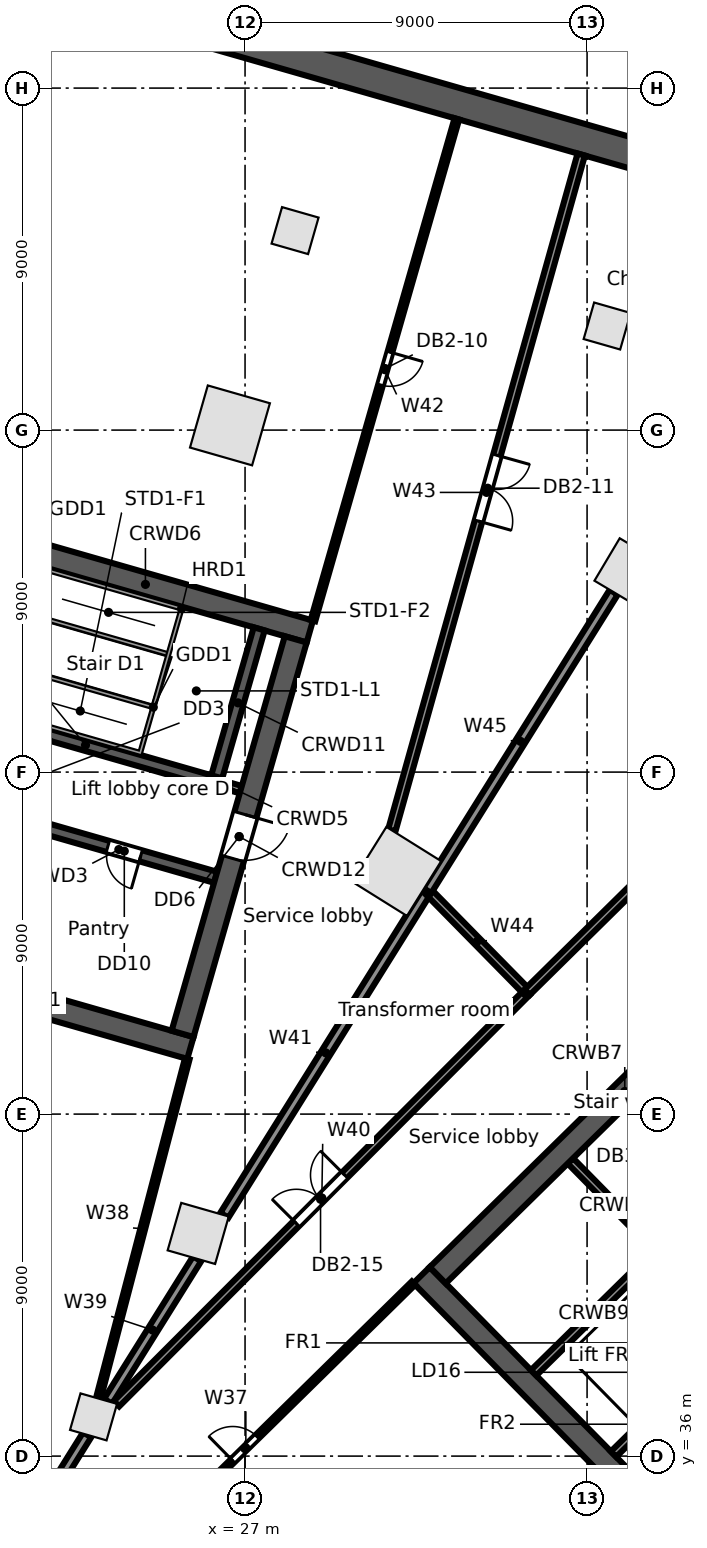
"""IFC4 building model, lengths in metres.
Left out: names, types, materials, properties, quantities, classifications, styles, units other than length and angle.
Written with IfcOpenShell. Run it as: python <this file> out.ifc"""

import sys

from ifc_helpers import new_model, si_unit, direction, frame, frame_2d, origin, origin_2d, place, context, subcontext, project, spatial, rectangle, extrude, element, fill, save


model = new_model("IFC4")
c1 = context("Model", 3, precision=1e-05, world=origin(), true_north=direction((0.0, 1.0)))
c2 = subcontext(c1, "Body", "Model", "MODEL_VIEW")
j1 = project(units=[si_unit("LENGTHUNIT", "METRE"), si_unit("PLANEANGLEUNIT", "RADIAN")], contexts=[c1])
p1 = place(None, origin())
s1 = spatial("IfcSite", under=j1, at=p1, CompositionType="ELEMENT")
p2 = place(p1, origin())
s2 = spatial("IfcBuilding", under=s1, at=p2, CompositionType="ELEMENT")
p3 = place(p2, frame((0.0, 0.0, -9.6)))
s3 = spatial("IfcBuildingStorey", under=s2, at=p3, CompositionType="ELEMENT", Elevation=-9.6)
p4 = place(p3, frame((38.062, 70.032, -0.5), z_axis=(0.0, 0.0, 1.0), x_axis=(-0.961260654426, 0.275640987977, 0.0)))
e1 = element("IfcWall", 1, at=p4, inside=s3, PredefinedType="SOLIDWALL", context=c2, shape_type="SweptSolid", body=[
    extrude(rectangle(XDim=35.435, YDim=0.8, at=frame_2d((17.718, 0.0))), origin(), (0.0, 0.0, 1.0), 5.3),
])
p5 = place(p3, frame((37.085, 59.262, -0.5), z_axis=(0.0, 0.0, 1.0), x_axis=(-0.859406411501, 0.511293086077, 0.0)))
e2 = element("IfcColumn", 2, at=p5, inside=s3, PredefinedType="COLUMN", context=c2, shape_type="SweptSolid", body=[
    extrude(rectangle(XDim=1.3, YDim=1.3, at=origin_2d()), origin(), (0.0, 0.0, 1.0), 5.3),
])
p6 = place(p3, frame((26.603, 63.124, -0.5), z_axis=(0.0, 0.0, 1.0), x_axis=(-0.961261695938, 0.275637355817, 0.0)))
e3 = element("IfcColumn", 3, at=p6, inside=s3, PredefinedType="COLUMN", context=c2, shape_type="SweptSolid", body=[
    extrude(rectangle(XDim=1.7, YDim=1.7, at=origin_2d()), origin(), (0.0, 0.0, 1.0), 5.3),
])
p7 = place(p3, frame((25.767, 41.86, -0.5), z_axis=(0.0, 0.0, 1.0), x_axis=(0.961261695938, -0.275637355817, 0.0)))
e4 = element("IfcColumn", 4, at=p7, inside=s3, PredefinedType="COLUMN", context=c2, shape_type="SweptSolid", body=[
    extrude(rectangle(XDim=1.3, YDim=1.3, at=origin_2d()), origin(), (0.0, 0.0, 1.0), 5.3),
])
p8 = place(p3, frame((30.99, 51.386, -0.5), z_axis=(0.0, 0.0, 1.0), x_axis=(0.529919264233, 0.848048096156, 0.0)))
e5 = element("IfcColumn", 5, at=p8, inside=s3, PredefinedType="COLUMN", context=c2, shape_type="SweptSolid", body=[
    extrude(rectangle(XDim=1.7, YDim=1.7, at=origin_2d()), origin(), (0.0, 0.0, 1.0), 5.3),
])
for number, where, z_axis, x_axis in (
    (6, (36.528, 65.739, -0.5), (0.0, 0.0, 1.0), (-0.961, 0.276, 0.0)),
    (7, (28.316, 68.25, -0.5), (0.0, 0.0, 1.0), (-0.961, 0.276, 0.0)),
    (8, (23.013, 37.032, -0.5), (0.0, 0.0, 1.0), (0.961, -0.276, 0.0)),
):
    element("IfcColumn", number, at=place(p3, frame(where, z_axis=z_axis, x_axis=x_axis)), inside=s3, PredefinedType="COLUMN", context=c2, shape_type="SweptSolid", body=[
        extrude(rectangle(XDim=1.0, YDim=1.0, at=origin_2d()), origin(), (0.0, 0.0, 1.0), 5.3),
    ])
p9 = place(p3, frame((31.646, 40.763, 0.0), z_axis=(0.0, 0.0, 1.0), x_axis=(0.700911255944, -0.713248491965, 0.0)))
e9 = element("IfcWall", 9, at=p9, inside=s3, PredefinedType="SOLIDWALL", context=c2, shape_type="SweptSolid", body=[
    extrude(rectangle(XDim=15.0, YDim=0.6, at=frame_2d((7.5, 0.0))), origin(), (0.0, 0.0, 1.0), 4.4),
])
p10 = place(p9, frame((12.9, 0.0, 0.0)))
e10 = element("IfcOpeningElement", 10, at=p10, cuts=e9, PredefinedType="OPENING", context=c2, shape_type="SweptSolid", body=[
    extrude(rectangle(XDim=1.2, YDim=2.1, at=frame_2d((0.6, 1.05))), frame((0.0, 0.31, 0.0), z_axis=(0.0, -1.0, 0.0), x_axis=(1.0, 0.0, 0.0)), (0.0, 0.0, 1.0), 0.62),
])
p11 = place(p3, frame((35.561, 43.769, 0.0), z_axis=(0.0, 0.0, 1.0), x_axis=(0.70090232736, -0.713257266, 0.0)))
e11 = element("IfcWall", 11, at=p11, inside=s3, PredefinedType="SOLIDWALL", context=c2, shape_type="SweptSolid", body=[
    extrude(rectangle(XDim=3.3, YDim=0.2, at=frame_2d((1.65, 0.0))), origin(), (0.0, 0.0, 1.0), 4.4),
])
p12 = place(p3, frame((32.07, 40.759, 0.0), z_axis=(0.0, 0.0, 1.0), x_axis=(0.713245344712, 0.70091445858, 0.0)))
e12 = element("IfcWall", 12, at=p12, inside=s3, PredefinedType="SOLIDWALL", context=c2, shape_type="SweptSolid", body=[
    extrude(rectangle(XDim=13.8, YDim=0.6, at=frame_2d((6.9, 0.0))), origin(), (0.0, 0.0, 1.0), 4.4),
])
p13 = place(p3, frame((37.104, 42.342, 0.0), z_axis=(0.0, 0.0, 1.0), x_axis=(0.713281298468, 0.700877870428, 0.0)))
e13 = element("IfcWall", 13, at=p13, inside=s3, PredefinedType="PARTITIONING", context=c2, shape_type="SweptSolid", body=[
    extrude(rectangle(XDim=4.35, YDim=0.2, at=frame_2d((2.175, 0.0))), origin(), (0.0, 0.0, 1.0), 4.4),
])
p14 = place(p13, frame((1.7, 0.0, 0.0)))
e14 = element("IfcOpeningElement", 14, at=p14, cuts=e13, PredefinedType="OPENING", context=c2, shape_type="SweptSolid", body=[
    extrude(rectangle(XDim=1.0, YDim=2.1, at=frame_2d((0.5, 1.05))), frame((0.0, 0.11, 0.0), z_axis=(0.0, -1.0, 0.0), x_axis=(1.0, 0.0, 0.0)), (0.0, 0.0, 1.0), 0.22),
])
p15 = place(p3, frame((34.593, 38.191, 0.0), z_axis=(0.0, 0.0, 1.0), x_axis=(0.713252216116, 0.700907466222, 0.0)))
e15 = element("IfcWall", 15, at=p15, inside=s3, PredefinedType="SOLIDWALL", context=c2, shape_type="SweptSolid", body=[
    extrude(rectangle(XDim=4.45, YDim=0.2, at=frame_2d((2.225, 0.0))), origin(), (0.0, 0.0, 1.0), 4.4),
])
p16 = place(p3, frame((36.696, 36.052, 0.0), z_axis=(0.0, 0.0, 1.0), x_axis=(0.713251741427, 0.700907949271, 0.0)))
e16 = element("IfcWall", 16, at=p16, inside=s3, PredefinedType="SOLIDWALL", context=c2, shape_type="SweptSolid", body=[
    extrude(rectangle(XDim=4.45, YDim=0.2, at=frame_2d((2.225, 0.0))), origin(), (0.0, 0.0, 1.0), 4.4),
])
p17 = place(p3, frame((16.911, 49.221, 0.0), z_axis=(0.0, 0.0, 1.0), x_axis=(0.96126248289, -0.275634611374, 0.0)))
e17 = element("IfcWall", 17, at=p17, inside=s3, PredefinedType="SOLIDWALL", context=c2, shape_type="SweptSolid", body=[
    extrude(rectangle(XDim=9.0, YDim=0.6, at=frame_2d((4.5, 0.0))), origin(), (0.0, 0.0, 1.0), 4.4),
])
p18 = place(p3, frame((21.131, 52.692, 0.0), z_axis=(0.0, 0.0, 1.0), x_axis=(0.961271492568, -0.275603188616, 0.0)))
e18 = element("IfcWall", 18, at=p18, inside=s3, PredefinedType="SOLIDWALL", context=c2, shape_type="SweptSolid", body=[
    extrude(rectangle(XDim=5.3, YDim=0.3, at=frame_2d((2.65, 0.0))), origin(), (0.0, 0.0, 1.0), 4.4),
])
p19 = place(p18, frame((2.35, 0.0, 0.0)))
e19 = element("IfcOpeningElement", 19, at=p19, cuts=e18, PredefinedType="OPENING", context=c2, shape_type="SweptSolid", body=[
    extrude(rectangle(XDim=0.9, YDim=2.1, at=frame_2d((0.45, 1.05))), frame((0.0, 0.16, 0.0), z_axis=(0.0, -1.0, 0.0), x_axis=(1.0, 0.0, 0.0)), (0.0, 0.0, 1.0), 0.32),
])
p20 = place(p3, frame((19.389, 55.689, 0.0), z_axis=(0.0, 0.0, 1.0), x_axis=(0.961261397636, -0.275638396117, 0.0)))
e20 = element("IfcWall", 20, at=p20, inside=s3, PredefinedType="SOLIDWALL", context=c2, shape_type="SweptSolid", body=[
    extrude(rectangle(XDim=7.1, YDim=0.3, at=frame_2d((3.55, 0.0))), origin(), (0.0, 0.0, 1.0), 4.4),
])
p21 = place(p20, frame((0.2, 0.0, 0.0)))
e21 = element("IfcOpeningElement", 21, at=p21, cuts=e20, PredefinedType="OPENING", context=c2, shape_type="SweptSolid", body=[
    extrude(rectangle(XDim=1.0, YDim=2.1, at=frame_2d((0.5, 1.05))), frame((0.0, 0.16, 0.0), z_axis=(0.0, -1.0, 0.0), x_axis=(1.0, 0.0, 0.0)), (0.0, 0.0, 1.0), 0.32),
])
p22 = place(p3, frame((26.214, 53.732, 0.0), z_axis=(0.0, 0.0, 1.0), x_axis=(0.96122076476, -0.27578005982, 0.0)))
e22 = element("IfcWall", 22, at=p22, inside=s3, PredefinedType="SOLIDWALL", context=c2, shape_type="SweptSolid", body=[
    extrude(rectangle(XDim=0.7, YDim=0.2, at=frame_2d((0.35, 0.0))), origin(), (0.0, 0.0, 1.0), 4.4),
])
p23 = place(p3, frame((20.053, 60.18, 0.0), z_axis=(0.0, 0.0, 1.0), x_axis=(0.96126248289, -0.275634611374, 0.0)))
e23 = element("IfcWall", 23, at=p23, inside=s3, PredefinedType="SOLIDWALL", context=c2, shape_type="SweptSolid", body=[
    extrude(rectangle(XDim=9.0, YDim=0.6, at=frame_2d((4.5, 0.0))), origin(), (0.0, 0.0, 1.0), 4.4),
])
p24 = place(p3, frame((26.256, 53.876, 0.0), z_axis=(0.0, 0.0, 1.0), x_axis=(0.275612739511, 0.961268754209, 0.0)))
e24 = element("IfcWall", 24, at=p24, inside=s3, PredefinedType="SOLIDWALL", context=c2, shape_type="SweptSolid", body=[
    extrude(rectangle(XDim=4.05, YDim=0.3, at=frame_2d((2.025, 0.0))), origin(), (0.0, 0.0, 1.0), 4.4),
])
p25 = place(p3, frame((25.356, 47.112, 0.0), z_axis=(0.0, 0.0, 1.0), x_axis=(0.275631631629, 0.961263337304, 0.0)))
e25 = element("IfcWall", 25, at=p25, inside=s3, PredefinedType="SOLIDWALL", context=c2, shape_type="SweptSolid", body=[
    extrude(rectangle(XDim=10.8, YDim=0.6, at=frame_2d((5.4, 0.0))), origin(), (0.0, 0.0, 1.0), 4.4),
])
p26 = place(p25, frame((4.8, 0.0, 0.0)))
e26 = element("IfcOpeningElement", 26, at=p26, cuts=e25, PredefinedType="OPENING", context=c2, shape_type="SweptSolid", body=[
    extrude(rectangle(XDim=1.2, YDim=2.1, at=frame_2d((0.6, 1.05))), frame((0.0, 0.31, 0.0), z_axis=(0.0, -1.0, 0.0), x_axis=(1.0, 0.0, 0.0)), (0.0, 0.0, 1.0), 0.62),
])
p27 = place(p3, frame((20.916, 33.472, 0.0), z_axis=(0.0, 0.0, 1.0), x_axis=(0.529775918086, 0.848137651927, 0.0)))
e27 = element("IfcWall", 27, at=p27, inside=s3, PredefinedType="PARTITIONING", context=c2, shape_type="SweptSolid", body=[
    extrude(rectangle(XDim=3.641, YDim=0.25, at=frame_2d((1.821, 0.0))), origin(), (0.0, 0.0, 1.0), 4.4),
])
p28 = place(p3, frame((22.61, 31.884, 0.0), z_axis=(0.0, 0.0, 1.0), x_axis=(0.71329764845, 0.700861230712, 0.0)))
e28 = element("IfcWall", 28, at=p28, inside=s3, PredefinedType="PARTITIONING", context=c2, shape_type="SweptSolid", body=[
    extrude(rectangle(XDim=12.368, YDim=0.125, at=frame_2d((6.184, 0.0))), origin(), (0.0, 0.0, 1.0), 3.68),
])
p29 = place(p28, frame((5.7, 0.0, 0.0)))
e29 = element("IfcOpeningElement", 29, at=p29, cuts=e28, PredefinedType="OPENING", context=c2, shape_type="SweptSolid", body=[
    extrude(rectangle(XDim=0.9, YDim=2.1, at=frame_2d((0.45, 1.05))), frame((0.0, 0.073, 0.0), z_axis=(0.0, -1.0, 0.0), x_axis=(1.0, 0.0, 0.0)), (0.0, 0.0, 1.0), 0.145),
])
p30 = place(p3, frame((23.139, 37.516, 0.0), z_axis=(0.0, 0.0, 1.0), x_axis=(0.253335246865, 0.967378546741, 0.0)))
e30 = element("IfcWall", 30, at=p30, inside=s3, PredefinedType="PARTITIONING", context=c2, shape_type="SweptSolid", body=[
    extrude(rectangle(XDim=9.237, YDim=0.125, at=frame_2d((4.619, 0.0))), origin(), (0.0, 0.0, 1.0), 3.768),
])
p31 = place(p3, frame((23.396, 37.442, 0.0), z_axis=(0.0, 0.0, 1.0), x_axis=(0.529879823435, 0.848072740227, 0.0)))
e31 = element("IfcWall", 31, at=p31, inside=s3, PredefinedType="PARTITIONING", context=c2, shape_type="SweptSolid", body=[
    extrude(rectangle(XDim=4.422, YDim=0.25, at=frame_2d((2.211, 0.0))), origin(), (0.0, 0.0, 1.0), 3.462),
])
p32 = place(p3, frame((23.618, 37.379, 0.0), z_axis=(0.0, 0.0, 1.0), x_axis=(0.706356332605, 0.707856434165, 0.0)))
e32 = element("IfcWall", 32, at=p32, inside=s3, PredefinedType="PARTITIONING", context=c2, shape_type="SweptSolid", body=[
    extrude(rectangle(XDim=15.298, YDim=0.2, at=frame_2d((7.649, 0.0))), origin(), (0.0, 0.0, 1.0), 3.572),
])
p33 = place(p32, frame((6.7, 0.0, 0.0)))
e33 = element("IfcOpeningElement", 33, at=p33, cuts=e32, PredefinedType="OPENING", context=c2, shape_type="SweptSolid", body=[
    extrude(rectangle(XDim=1.8, YDim=2.1, at=frame_2d((0.9, 1.05))), frame((0.0, 0.11, 0.0), z_axis=(0.0, -1.0, 0.0), x_axis=(1.0, 0.0, 0.0)), (0.0, 0.0, 1.0), 0.22),
])
p34 = place(p3, frame((26.456, 42.338, 0.0), z_axis=(0.0, 0.0, 1.0), x_axis=(0.529866075757, 0.848081329686, 0.0)))
e34 = element("IfcWall", 34, at=p34, inside=s3, PredefinedType="PARTITIONING", context=c2, shape_type="SweptSolid", body=[
    extrude(rectangle(XDim=10.076, YDim=0.25, at=frame_2d((5.038, 0.0))), origin(), (0.0, 0.0, 1.0), 3.462),
])
p35 = place(p3, frame((28.787, 57.987, 0.0), z_axis=(0.0, 0.0, 1.0), x_axis=(0.27563893724, 0.961261242471, 0.0)))
e35 = element("IfcWall", 35, at=p35, inside=s3, PredefinedType="PARTITIONING", context=c2, shape_type="SweptSolid", body=[
    extrude(rectangle(XDim=13.735, YDim=0.125, at=frame_2d((6.867, 0.0))), origin(), (0.0, 0.0, 1.0), 3.68),
])
p36 = place(p35, frame((6.45, 0.0, 0.0)))
e36 = element("IfcOpeningElement", 36, at=p36, cuts=e35, PredefinedType="OPENING", context=c2, shape_type="SweptSolid", body=[
    extrude(rectangle(XDim=0.9, YDim=2.1, at=frame_2d((0.45, 1.05))), frame((0.0, 0.073, 0.0), z_axis=(0.0, -1.0, 0.0), x_axis=(1.0, 0.0, 0.0)), (0.0, 0.0, 1.0), 0.145),
])
p37 = place(p3, frame((30.862, 52.468, 0.0), z_axis=(0.0, 0.0, 1.0), x_axis=(0.269850069582, 0.962902352238, 0.0)))
e37 = element("IfcWall", 37, at=p37, inside=s3, PredefinedType="PARTITIONING", context=c2, shape_type="SweptSolid", body=[
    extrude(rectangle(XDim=18.469, YDim=0.2, at=frame_2d((9.234, 0.0))), origin(), (0.0, 0.0, 1.0), 3.68),
])
p38 = place(p37, frame((8.45, 0.0, 0.0)))
e38 = element("IfcOpeningElement", 38, at=p38, cuts=e37, PredefinedType="OPENING", context=c2, shape_type="SweptSolid", body=[
    extrude(rectangle(XDim=1.8, YDim=2.1, at=frame_2d((0.9, 1.05))), frame((0.0, 0.11, 0.0), z_axis=(0.0, -1.0, 0.0), x_axis=(1.0, 0.0, 0.0)), (0.0, 0.0, 1.0), 0.22),
])
p39 = place(p3, frame((31.795, 50.883, 0.0), z_axis=(0.0, 0.0, 1.0), x_axis=(0.700961783082, -0.713198835289, 0.0)))
e39 = element("IfcWall", 39, at=p39, inside=s3, PredefinedType="PARTITIONING", context=c2, shape_type="SweptSolid", body=[
    extrude(rectangle(XDim=3.751, YDim=0.2, at=frame_2d((1.875, 0.0))), origin(), (0.0, 0.0, 1.0), 3.572),
])
p40 = place(p3, frame((31.795, 50.883, 0.0), z_axis=(0.0, 0.0, 1.0), x_axis=(0.529939676421, 0.848035340864, 0.0)))
e40 = element("IfcWall", 40, at=p40, inside=s3, PredefinedType="PARTITIONING", context=c2, shape_type="SweptSolid", body=[
    extrude(rectangle(XDim=9.258, YDim=0.25, at=frame_2d((4.629, 0.0))), origin(), (0.0, 0.0, 1.0), 3.572),
])
p41 = place(p3, frame((33.916, 20.378, 0.0), z_axis=(0.0, 0.0, 1.0), x_axis=(0.857167223985, 0.515038202589, 0.0)))
e41 = element("IfcWall", 41, at=p41, inside=s3, PredefinedType="PARTITIONING", context=c2, shape_type="SweptSolid", body=[
    extrude(rectangle(XDim=39.374, YDim=0.125, at=frame_2d((19.687, 0.0))), origin(), (0.0, 0.0, 1.0), 3.48),
])
p42 = place(p3, frame((34.424, 48.208, 0.0), z_axis=(0.0, 0.0, 1.0), x_axis=(0.711998848244, 0.702180632102, 0.0)))
e42 = element("IfcWall", 42, at=p42, inside=s3, PredefinedType="PARTITIONING", context=c2, shape_type="SweptSolid", body=[
    extrude(rectangle(XDim=19.868, YDim=0.2, at=frame_2d((9.934, 0.0))), origin(), (0.0, 0.0, 1.0), 3.672),
])
p43 = place(p42, frame((8.95, 0.0, 0.0)))
e43 = element("IfcOpeningElement", 43, at=p43, cuts=e42, PredefinedType="OPENING", context=c2, shape_type="SweptSolid", body=[
    extrude(rectangle(XDim=1.8, YDim=2.1, at=frame_2d((0.9, 1.05))), frame((0.0, 0.11, 0.0), z_axis=(0.0, -1.0, 0.0), x_axis=(1.0, 0.0, 0.0)), (0.0, 0.0, 1.0), 0.22),
])
p44 = place(p26, frame((1.2, 0.0, 0.0), z_axis=(0.0, 0.0, 1.0), x_axis=(-1.0, 0.0, 0.0)))
e44 = element("IfcDoor", 44, at=p44, inside=s3, OperationType="SINGLE_SWING_LEFT", PredefinedType="DOOR", context=c2, shape_type="SweptSolid", body=[
    extrude(rectangle(XDim=1.2, YDim=2.1, at=frame_2d((0.6, 1.05))), frame((0.0, 0.025, 0.0), z_axis=(0.0, -1.0, 0.0), x_axis=(1.0, 0.0, 0.0)), (0.0, 0.0, 1.0), 0.05),
])
fill(e26, e44)
p45 = place(p19, frame((0.9, 0.0, 0.0), z_axis=(0.0, 0.0, 1.0), x_axis=(-1.0, 0.0, 0.0)))
e45 = element("IfcDoor", 45, at=p45, inside=s3, OperationType="SINGLE_SWING_LEFT", PredefinedType="DOOR", context=c2, shape_type="SweptSolid", body=[
    extrude(rectangle(XDim=0.9, YDim=2.1, at=frame_2d((0.45, 1.05))), frame((0.0, 0.025, 0.0), z_axis=(0.0, -1.0, 0.0), x_axis=(1.0, 0.0, 0.0)), (0.0, 0.0, 1.0), 0.05),
])
fill(e19, e45)
p46 = place(p36, frame((0.9, 0.0, 0.0), z_axis=(0.0, 0.0, 1.0), x_axis=(-1.0, 0.0, 0.0)))
e46 = element("IfcDoor", 46, at=p46, inside=s3, OperationType="SINGLE_SWING_LEFT", PredefinedType="DOOR", context=c2, shape_type="SweptSolid", body=[
    extrude(rectangle(XDim=0.9, YDim=2.1, at=frame_2d((0.45, 1.05))), frame((0.0, 0.025, 0.0), z_axis=(0.0, -1.0, 0.0), x_axis=(1.0, 0.0, 0.0)), (0.0, 0.0, 1.0), 0.05),
])
fill(e36, e46)
p47 = place(p38, frame((1.8, 0.0, 0.0), z_axis=(0.0, 0.0, 1.0), x_axis=(-1.0, 0.0, 0.0)))
e47 = element("IfcDoor", 47, at=p47, inside=s3, OperationType="DOUBLE_DOOR_SINGLE_SWING", PredefinedType="DOOR", context=c2, shape_type="SweptSolid", body=[
    extrude(rectangle(XDim=1.8, YDim=2.1, at=frame_2d((0.9, 1.05))), frame((0.0, 0.025, 0.0), z_axis=(0.0, -1.0, 0.0), x_axis=(1.0, 0.0, 0.0)), (0.0, 0.0, 1.0), 0.05),
])
fill(e38, e47)
p48 = place(p29, origin())
e48 = element("IfcDoor", 48, at=p48, inside=s3, OperationType="SINGLE_SWING_LEFT", PredefinedType="DOOR", context=c2, shape_type="SweptSolid", body=[
    extrude(rectangle(XDim=0.9, YDim=2.1, at=frame_2d((0.45, 1.05))), frame((0.0, 0.025, 0.0), z_axis=(0.0, -1.0, 0.0), x_axis=(1.0, 0.0, 0.0)), (0.0, 0.0, 1.0), 0.05),
])
fill(e29, e48)
p49 = place(p33, origin())
e49 = element("IfcDoor", 49, at=p49, inside=s3, OperationType="DOUBLE_DOOR_SINGLE_SWING", PredefinedType="DOOR", context=c2, shape_type="SweptSolid", body=[
    extrude(rectangle(XDim=1.8, YDim=2.1, at=frame_2d((0.9, 1.05))), frame((0.0, 0.025, 0.0), z_axis=(0.0, -1.0, 0.0), x_axis=(1.0, 0.0, 0.0)), (0.0, 0.0, 1.0), 0.05),
])
fill(e33, e49)
save(model, sys.argv[1])
